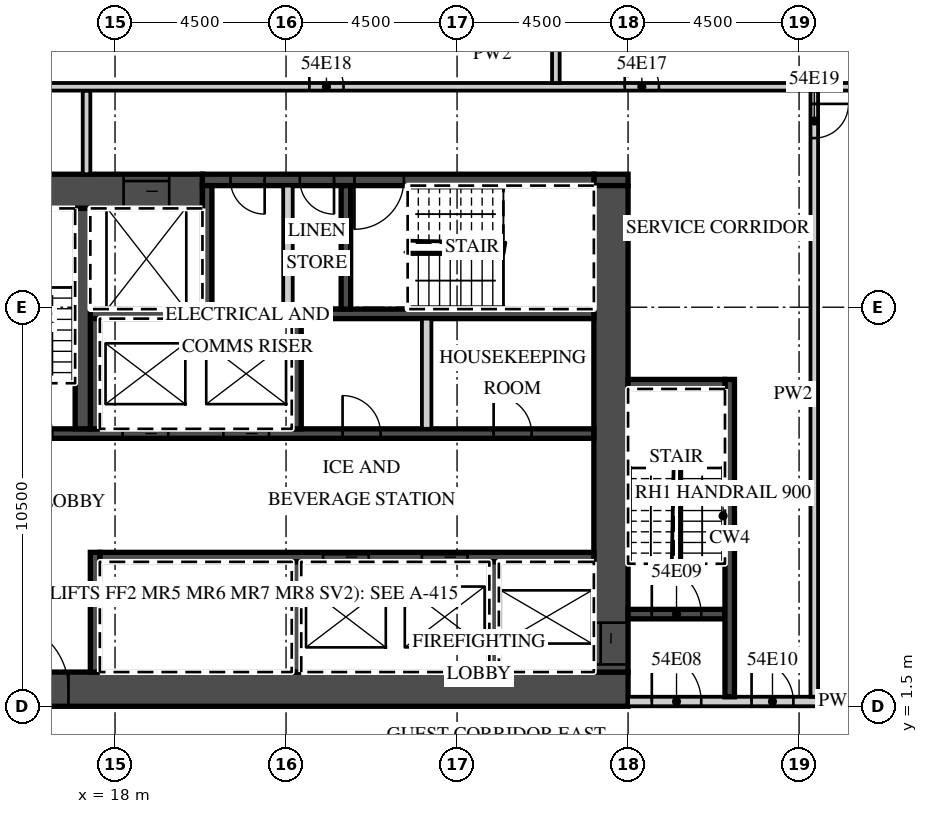
"""IFC4 building model, lengths in metres.
Left out: names, types, materials, properties, quantities, classifications, styles, units other than length and angle.
Written with IfcOpenShell. Run it as: python <this file> out.ifc"""

import sys

from ifc_helpers import new_model, si_unit, direction, frame, frame_2d, origin, place, context, subcontext, project, spatial, rectangle, extrude, element, fill, save


model = new_model("IFC4")
c1 = context("Model", 3, precision=1e-05, world=origin(), true_north=direction((0.0, 1.0)))
c2 = subcontext(c1, "Body", "Model", "MODEL_VIEW")
j1 = project(units=[si_unit("LENGTHUNIT", "METRE"), si_unit("PLANEANGLEUNIT", "RADIAN")], contexts=[c1])
p1 = place(None, origin())
s1 = spatial("IfcSite", under=j1, at=p1, CompositionType="ELEMENT")
p2 = place(p1, origin())
s2 = spatial("IfcBuilding", under=s1, at=p2, CompositionType="ELEMENT")
p3 = place(p2, frame((0.0, 0.0, 224.3)))
s3 = spatial("IfcBuildingStorey", under=s2, at=p3, CompositionType="ELEMENT", Elevation=224.3)
p4 = place(p3, frame((13.5, 1.95, 0.0), z_axis=(0.0, 0.0, 1.0), x_axis=(1.0, 0.0, 0.0)))
e1 = element("IfcWall", 1, at=p4, inside=s3, PredefinedType="SHEAR", context=c2, shape_type="SweptSolid", body=[
    extrude(rectangle(XDim=18.0, YDim=0.9, at=frame_2d((9.0, 0.0))), origin(), (0.0, 0.0, 1.0), 3.02),
])
p5 = place(p4, frame((1.475, 0.0, 0.0)))
e2 = element("IfcOpeningElement", 2, at=p5, cuts=e1, PredefinedType="OPENING", context=c2, shape_type="SweptSolid", body=[
    extrude(rectangle(XDim=1.8, YDim=2.1, at=frame_2d((0.9, 1.05))), frame((0.0, 0.46, 0.0), z_axis=(0.0, -1.0, 0.0), x_axis=(1.0, 0.0, 0.0)), (0.0, 0.0, 1.0), 0.92),
])
p6 = place(p3, frame((13.5, 15.05, 0.0), z_axis=(0.0, 0.0, 1.0), x_axis=(1.0, 0.0, 0.0)))
e3 = element("IfcWall", 3, at=p6, inside=s3, PredefinedType="SHEAR", context=c2, shape_type="SweptSolid", body=[
    extrude(rectangle(XDim=6.8, YDim=0.9, at=frame_2d((3.4, 0.0))), origin(), (0.0, 0.0, 1.0), 3.02),
])
p7 = place(p6, frame((4.725, 0.0, 0.0)))
e4 = element("IfcOpeningElement", 4, at=p7, cuts=e3, PredefinedType="OPENING", context=c2, shape_type="SweptSolid", body=[
    extrude(rectangle(XDim=1.2, YDim=2.1, at=frame_2d((0.6, 1.05))), frame((0.0, 0.46, 0.0), z_axis=(0.0, -1.0, 0.0), x_axis=(1.0, 0.0, 0.0)), (0.0, 0.0, 1.0), 0.92),
])
p8 = place(p3, frame((30.6, 15.35, 0.0), z_axis=(0.0, 0.0, 1.0), x_axis=(1.0, 0.0, 0.0)))
e5 = element("IfcWall", 5, at=p8, inside=s3, PredefinedType="SHEAR", context=c2, shape_type="SweptSolid", body=[
    extrude(rectangle(XDim=0.9, YDim=0.3, at=frame_2d((0.45, 0.0))), origin(), (0.0, 0.0, 1.0), 3.02),
])
p9 = place(p3, frame((20.3, 15.35, 0.0), z_axis=(0.0, 0.0, 1.0), x_axis=(1.0, 0.0, 0.0)))
e6 = element("IfcWall", 6, at=p9, inside=s3, PredefinedType="SHEAR", context=c2, shape_type="SweptSolid", body=[
    extrude(rectangle(XDim=10.3, YDim=0.3, at=frame_2d((5.15, 0.0))), origin(), (0.0, 0.0, 1.0), 3.02),
])
p10 = place(p9, frame((4.0, 0.0, 0.0)))
e7 = element("IfcOpeningElement", 7, at=p10, cuts=e6, PredefinedType="OPENING", context=c2, shape_type="SweptSolid", body=[
    extrude(rectangle(XDim=1.3, YDim=2.1, at=frame_2d((0.65, 1.05))), frame((0.0, 0.16, 0.0), z_axis=(0.0, -1.0, 0.0), x_axis=(1.0, 0.0, 0.0)), (0.0, 0.0, 1.0), 0.32),
])
p11 = place(p9, frame((2.562, 0.0, 0.0)))
e8 = element("IfcOpeningElement", 8, at=p11, cuts=e6, PredefinedType="OPENING", context=c2, shape_type="SweptSolid", body=[
    extrude(rectangle(XDim=0.9, YDim=2.1, at=frame_2d((0.45, 1.05))), frame((0.0, 0.16, 0.0), z_axis=(0.0, -1.0, 0.0), x_axis=(1.0, 0.0, 0.0)), (0.0, 0.0, 1.0), 0.32),
])
p12 = place(p9, frame((0.738, 0.0, 0.0)))
e9 = element("IfcOpeningElement", 9, at=p12, cuts=e6, PredefinedType="OPENING", context=c2, shape_type="SweptSolid", body=[
    extrude(rectangle(XDim=0.9, YDim=2.1, at=frame_2d((0.45, 1.05))), frame((0.0, 0.16, 0.0), z_axis=(0.0, -1.0, 0.0), x_axis=(1.0, 0.0, 0.0)), (0.0, 0.0, 1.0), 0.32),
])
p13 = place(p3, frame((31.05, 2.4, 0.0), z_axis=(0.0, 0.0, 1.0), x_axis=(0.0, 1.0, 0.0)))
e10 = element("IfcWall", 10, at=p13, inside=s3, PredefinedType="SHEAR", context=c2, shape_type="SweptSolid", body=[
    extrude(rectangle(XDim=12.8, YDim=0.9, at=frame_2d((6.4, 0.0))), origin(), (0.0, 0.0, 1.0), 3.02),
])
p14 = place(p13, frame((0.2, 0.0, 0.0)))
e11 = element("IfcOpeningElement", 11, at=p14, cuts=e10, PredefinedType="OPENING", context=c2, shape_type="SweptSolid", body=[
    extrude(rectangle(XDim=1.1, YDim=2.1, at=frame_2d((0.55, 1.05))), frame((0.0, 0.46, 0.0), z_axis=(0.0, -1.0, 0.0), x_axis=(1.0, 0.0, 0.0)), (0.0, 0.0, 1.0), 0.92),
])
p15 = place(p3, frame((17.6, 5.425, 0.0), z_axis=(0.0, 0.0, 1.0), x_axis=(1.0, 0.0, 0.0)))
e12 = element("IfcWall", 12, at=p15, inside=s3, PredefinedType="SHEAR", context=c2, shape_type="SweptSolid", body=[
    extrude(rectangle(XDim=13.0, YDim=0.25, at=frame_2d((6.5, 0.0))), origin(), (0.0, 0.0, 1.0), 3.02),
])
p16 = place(p15, frame((8.475, 0.0, 0.0)))
e13 = element("IfcOpeningElement", 13, at=p16, cuts=e12, PredefinedType="OPENING", context=c2, shape_type="SweptSolid", body=[
    extrude(rectangle(XDim=1.2, YDim=2.1, at=frame_2d((0.6, 1.05))), frame((0.0, 0.135, 0.0), z_axis=(0.0, -1.0, 0.0), x_axis=(1.0, 0.0, 0.0)), (0.0, 0.0, 1.0), 0.27),
])
p17 = place(p15, frame((5.875, 0.0, 0.0)))
e14 = element("IfcOpeningElement", 14, at=p17, cuts=e12, PredefinedType="OPENING", context=c2, shape_type="SweptSolid", body=[
    extrude(rectangle(XDim=1.2, YDim=2.1, at=frame_2d((0.6, 1.05))), frame((0.0, 0.135, 0.0), z_axis=(0.0, -1.0, 0.0), x_axis=(1.0, 0.0, 0.0)), (0.0, 0.0, 1.0), 0.27),
])
p18 = place(p3, frame((17.475, 2.4, 0.0), z_axis=(0.0, 0.0, 1.0), x_axis=(0.0, 1.0, 0.0)))
e15 = element("IfcWall", 15, at=p18, inside=s3, PredefinedType="SHEAR", context=c2, shape_type="SweptSolid", body=[
    extrude(rectangle(XDim=3.15, YDim=0.25, at=frame_2d((1.575, 0.0))), origin(), (0.0, 0.0, 1.0), 3.02),
])
for number, where, z_axis, x_axis in (
    (16, (27.975, 2.4, 0.0), (0.0, 0.0, 1.0), (0.0, 1.0, 0.0)),
    (17, (22.775, 2.4, 0.0), (0.0, 0.0, 1.0), (0.0, 1.0, 0.0)),
):
    element("IfcWall", number, at=place(p3, frame(where, z_axis=z_axis, x_axis=x_axis)), inside=s3, PredefinedType="SHEAR", context=c2, shape_type="SweptSolid", body=[
        extrude(rectangle(XDim=2.9, YDim=0.25, at=frame_2d((1.45, 0.0))), origin(), (0.0, 0.0, 1.0), 3.02),
    ])
p19 = place(p3, frame((14.4, 8.675, 0.0), z_axis=(0.0, 0.0, 1.0), x_axis=(1.0, 0.0, 0.0)))
e18 = element("IfcWall", 18, at=p19, inside=s3, PredefinedType="SHEAR", context=c2, shape_type="SweptSolid", body=[
    extrude(rectangle(XDim=16.2, YDim=0.25, at=frame_2d((8.1, 0.0))), origin(), (0.0, 0.0, 1.0), 3.02),
])
p20 = place(p19, frame((6.45, 0.0, 0.0)))
e19 = element("IfcOpeningElement", 19, at=p20, cuts=e18, PredefinedType="OPENING", context=c2, shape_type="SweptSolid", body=[
    extrude(rectangle(XDim=1.2, YDim=2.1, at=frame_2d((0.6, 1.05))), frame((0.0, 0.135, 0.0), z_axis=(0.0, -1.0, 0.0), x_axis=(1.0, 0.0, 0.0)), (0.0, 0.0, 1.0), 0.27),
])
p21 = place(p19, frame((3.8, 0.0, 0.0)))
e20 = element("IfcOpeningElement", 20, at=p21, cuts=e18, PredefinedType="OPENING", context=c2, shape_type="SweptSolid", body=[
    extrude(rectangle(XDim=1.2, YDim=2.1, at=frame_2d((0.6, 1.05))), frame((0.0, 0.135, 0.0), z_axis=(0.0, -1.0, 0.0), x_axis=(1.0, 0.0, 0.0)), (0.0, 0.0, 1.0), 0.27),
])
p22 = place(p19, frame((0.65, 0.0, 0.0)))
e21 = element("IfcOpeningElement", 21, at=p22, cuts=e18, PredefinedType="OPENING", context=c2, shape_type="SweptSolid", body=[
    extrude(rectangle(XDim=1.3, YDim=2.1, at=frame_2d((0.65, 1.05))), frame((0.0, 0.135, 0.0), z_axis=(0.0, -1.0, 0.0), x_axis=(1.0, 0.0, 0.0)), (0.0, 0.0, 1.0), 0.27),
])
p23 = place(p19, frame((13.562, 0.0, 0.0)))
e22 = element("IfcOpeningElement", 22, at=p23, cuts=e18, PredefinedType="OPENING", context=c2, shape_type="SweptSolid", body=[
    extrude(rectangle(XDim=1.0, YDim=2.1, at=frame_2d((0.5, 1.05))), frame((0.0, 0.135, 0.0), z_axis=(0.0, -1.0, 0.0), x_axis=(1.0, 0.0, 0.0)), (0.0, 0.0, 1.0), 0.27),
])
p24 = place(p19, frame((9.587, 0.0, 0.0)))
e23 = element("IfcOpeningElement", 23, at=p24, cuts=e18, PredefinedType="OPENING", context=c2, shape_type="SweptSolid", body=[
    extrude(rectangle(XDim=1.0, YDim=2.1, at=frame_2d((0.5, 1.05))), frame((0.0, 0.135, 0.0), z_axis=(0.0, -1.0, 0.0), x_axis=(1.0, 0.0, 0.0)), (0.0, 0.0, 1.0), 0.27),
])
p25 = place(p3, frame((17.35, 11.825, 0.0), z_axis=(0.0, 0.0, 1.0), x_axis=(1.0, 0.0, 0.0)))
e24 = element("IfcWall", 24, at=p25, inside=s3, PredefinedType="SHEAR", context=c2, shape_type="SweptSolid", body=[
    extrude(rectangle(XDim=13.25, YDim=0.25, at=frame_2d((6.625, 0.0))), origin(), (0.0, 0.0, 1.0), 3.02),
])
for number, where, z_axis, x_axis in (
    (25, (17.475, 8.8, 0.0), (0.0, 0.0, 1.0), (0.0, 1.0, 0.0)),
    (26, (22.775, 8.8, 0.0), (0.0, 0.0, 1.0), (0.0, 1.0, 0.0)),
):
    element("IfcWall", number, at=place(p3, frame(where, z_axis=z_axis, x_axis=x_axis)), inside=s3, PredefinedType="SHEAR", context=c2, shape_type="SweptSolid", body=[
        extrude(rectangle(XDim=2.9, YDim=0.25, at=frame_2d((1.45, 0.0))), origin(), (0.0, 0.0, 1.0), 3.02),
    ])
p26 = place(p3, frame((26.2, 8.8, 0.0), z_axis=(0.0, 0.0, 1.0), x_axis=(0.0, 1.0, 0.0)))
e27 = element("IfcWall", 27, at=p26, inside=s3, PredefinedType="PARTITIONING", context=c2, shape_type="SweptSolid", body=[
    extrude(rectangle(XDim=2.9, YDim=0.25, at=frame_2d((1.45, 0.0))), origin(), (0.0, 0.0, 1.0), 3.02),
])
p27 = place(p3, frame((17.15, 8.8, 0.0), z_axis=(0.0, 0.0, 1.0), x_axis=(0.0, 1.0, 0.0)))
e28 = element("IfcWall", 28, at=p27, inside=s3, PredefinedType="SHEAR", context=c2, shape_type="SweptSolid", body=[
    extrude(rectangle(XDim=5.8, YDim=0.4, at=frame_2d((2.9, 0.0))), origin(), (0.0, 0.0, 1.0), 3.02),
])
for number, where, z_axis, x_axis in (
    (29, (20.425, 11.95, 0.0), (0.0, 0.0, 1.0), (0.0, 1.0, 0.0)),
    (30, (24.075, 11.95, 0.0), (0.0, 0.0, 1.0), (0.0, 1.0, 0.0)),
):
    element("IfcWall", number, at=place(p3, frame(where, z_axis=z_axis, x_axis=x_axis)), inside=s3, PredefinedType="SHEAR", context=c2, shape_type="SweptSolid", body=[
        extrude(rectangle(XDim=3.25, YDim=0.25, at=frame_2d((1.625, 0.0))), origin(), (0.0, 0.0, 1.0), 3.02),
    ])
p28 = place(p3, frame((22.55, 11.95, 0.0), z_axis=(0.0, 0.0, 1.0), x_axis=(0.0, 1.0, 0.0)))
e31 = element("IfcWall", 31, at=p28, inside=s3, PredefinedType="PARTITIONING", context=c2, shape_type="SweptSolid", body=[
    extrude(rectangle(XDim=3.25, YDim=0.25, at=frame_2d((1.625, 0.0))), origin(), (0.0, 0.0, 1.0), 3.02),
])
p29 = place(p3, frame((31.5, 1.625, 0.0), z_axis=(0.0, 0.0, 1.0), x_axis=(1.0, 0.0, 0.0)))
e32 = element("IfcWall", 32, at=p29, inside=s3, PredefinedType="PARTITIONING", context=c2, shape_type="SweptSolid", body=[
    extrude(rectangle(XDim=11.04, YDim=0.25, at=frame_2d((5.52, 0.0))), origin(), (0.0, 0.0, 1.0), 3.02),
])
p30 = place(p29, frame((0.625, 0.0, 0.0)))
e33 = element("IfcOpeningElement", 33, at=p30, cuts=e32, PredefinedType="OPENING", context=c2, shape_type="SweptSolid", body=[
    extrude(rectangle(XDim=1.3, YDim=2.1, at=frame_2d((0.65, 1.05))), frame((0.0, 0.135, 0.0), z_axis=(0.0, -1.0, 0.0), x_axis=(1.0, 0.0, 0.0)), (0.0, 0.0, 1.0), 0.27),
])
p31 = place(p29, frame((3.25, 0.0, 0.0)))
e34 = element("IfcOpeningElement", 34, at=p31, cuts=e32, PredefinedType="OPENING", context=c2, shape_type="SweptSolid", body=[
    extrude(rectangle(XDim=1.1, YDim=2.1, at=frame_2d((0.55, 1.05))), frame((0.0, 0.135, 0.0), z_axis=(0.0, -1.0, 0.0), x_axis=(1.0, 0.0, 0.0)), (0.0, 0.0, 1.0), 0.27),
])
p32 = place(p3, frame((31.5, 3.925, 0.0), z_axis=(0.0, 0.0, 1.0), x_axis=(1.0, 0.0, 0.0)))
e35 = element("IfcWall", 35, at=p32, inside=s3, PredefinedType="SHEAR", context=c2, shape_type="SweptSolid", body=[
    extrude(rectangle(XDim=2.55, YDim=0.25, at=frame_2d((1.275, 0.0))), origin(), (0.0, 0.0, 1.0), 3.02),
])
p33 = place(p32, frame((0.625, 0.0, 0.0)))
e36 = element("IfcOpeningElement", 36, at=p33, cuts=e35, PredefinedType="OPENING", context=c2, shape_type="SweptSolid", body=[
    extrude(rectangle(XDim=1.3, YDim=2.1, at=frame_2d((0.65, 1.05))), frame((0.0, 0.135, 0.0), z_axis=(0.0, -1.0, 0.0), x_axis=(1.0, 0.0, 0.0)), (0.0, 0.0, 1.0), 0.27),
])
p34 = place(p3, frame((34.175, 1.75, 0.0), z_axis=(0.0, 0.0, 1.0), x_axis=(0.0, 1.0, 0.0)))
e37 = element("IfcWall", 37, at=p34, inside=s3, PredefinedType="SHEAR", context=c2, shape_type="SweptSolid", body=[
    extrude(rectangle(XDim=8.35, YDim=0.25, at=frame_2d((4.175, 0.0))), origin(), (0.0, 0.0, 1.0), 3.02),
])
p35 = place(p3, frame((31.5, 9.975, 0.0), z_axis=(0.0, 0.0, 1.0), x_axis=(1.0, 0.0, 0.0)))
e38 = element("IfcWall", 38, at=p35, inside=s3, PredefinedType="SHEAR", context=c2, shape_type="SweptSolid", body=[
    extrude(rectangle(XDim=2.55, YDim=0.25, at=frame_2d((1.275, 0.0))), origin(), (0.0, 0.0, 1.0), 3.02),
])
p36 = place(p3, frame((17.25, 15.5, 0.0), z_axis=(0.0, 0.0, 1.0), x_axis=(0.0, 1.0, 0.0)))
e39 = element("IfcWall", 39, at=p36, inside=s3, PredefinedType="PARTITIONING", context=c2, shape_type="SweptSolid", body=[
    extrude(rectangle(XDim=2.2, YDim=0.2, at=frame_2d((1.1, 0.0))), origin(), (0.0, 0.0, 1.0), 3.02),
])
p37 = place(p3, frame((36.4, 1.75, 0.0), z_axis=(0.0, 0.0, 1.0), x_axis=(0.0, 1.0, 0.0)))
e40 = element("IfcWall", 40, at=p37, inside=s3, PredefinedType="PARTITIONING", context=c2, shape_type="SweptSolid", body=[
    extrude(rectangle(XDim=15.95, YDim=0.2, at=frame_2d((7.975, 0.0))), origin(), (0.0, 0.0, 1.0), 3.02),
])
p38 = place(p37, frame((14.7, 0.0, 0.0)))
e41 = element("IfcOpeningElement", 41, at=p38, cuts=e40, PredefinedType="OPENING", context=c2, shape_type="SweptSolid", body=[
    extrude(rectangle(XDim=0.9, YDim=2.1, at=frame_2d((0.45, 1.05))), frame((0.0, 0.11, 0.0), z_axis=(0.0, -1.0, 0.0), x_axis=(1.0, 0.0, 0.0)), (0.0, 0.0, 1.0), 0.22),
])
p39 = place(p3, frame((13.6, 17.8, 0.0), z_axis=(0.0, 0.0, 1.0), x_axis=(1.0, 0.0, 0.0)))
e42 = element("IfcWall", 42, at=p39, inside=s3, PredefinedType="PARTITIONING", context=c2, shape_type="SweptSolid", body=[
    extrude(rectangle(XDim=28.657, YDim=0.2, at=frame_2d((14.329, 0.0))), origin(), (0.0, 0.0, 1.0), 3.02),
])
p40 = place(p39, frame((17.812, 0.0, 0.0)))
e43 = element("IfcOpeningElement", 43, at=p40, cuts=e42, PredefinedType="OPENING", context=c2, shape_type="SweptSolid", body=[
    extrude(rectangle(XDim=0.9, YDim=2.1, at=frame_2d((0.45, 1.05))), frame((0.0, 0.11, 0.0), z_axis=(0.0, -1.0, 0.0), x_axis=(1.0, 0.0, 0.0)), (0.0, 0.0, 1.0), 0.22),
])
p41 = place(p39, frame((9.512, 0.0, 0.0)))
e44 = element("IfcOpeningElement", 44, at=p41, cuts=e42, PredefinedType="OPENING", context=c2, shape_type="SweptSolid", body=[
    extrude(rectangle(XDim=0.9, YDim=2.1, at=frame_2d((0.45, 1.05))), frame((0.0, 0.11, 0.0), z_axis=(0.0, -1.0, 0.0), x_axis=(1.0, 0.0, 0.0)), (0.0, 0.0, 1.0), 0.22),
])
p42 = place(p3, frame((29.6, 17.9, 0.0), z_axis=(0.0, 0.0, 1.0), x_axis=(0.0, 1.0, 0.0)))
e45 = element("IfcWall", 45, at=p42, inside=s3, PredefinedType="PARTITIONING", context=c2, shape_type="SweptSolid", body=[
    extrude(rectangle(XDim=3.318, YDim=0.2, at=frame_2d((1.659, 0.0))), origin(), (0.0, 0.0, 1.0), 3.02),
])
p43 = place(p20, origin())
e46 = element("IfcDoor", 46, at=p43, inside=s3, OperationType="SLIDING_TO_LEFT", PredefinedType="DOOR", context=c2, shape_type="SweptSolid", body=[
    extrude(rectangle(XDim=1.2, YDim=2.1, at=frame_2d((0.6, 1.05))), frame((0.0, 0.025, 0.0), z_axis=(0.0, -1.0, 0.0), x_axis=(1.0, 0.0, 0.0)), (0.0, 0.0, 1.0), 0.05),
])
fill(e19, e46)
p44 = place(p21, origin())
e47 = element("IfcDoor", 47, at=p44, inside=s3, OperationType="SLIDING_TO_RIGHT", PredefinedType="DOOR", context=c2, shape_type="SweptSolid", body=[
    extrude(rectangle(XDim=1.2, YDim=2.1, at=frame_2d((0.6, 1.05))), frame((0.0, 0.025, 0.0), z_axis=(0.0, -1.0, 0.0), x_axis=(1.0, 0.0, 0.0)), (0.0, 0.0, 1.0), 0.05),
])
fill(e20, e47)
p45 = place(p16, origin())
e48 = element("IfcDoor", 48, at=p45, inside=s3, OperationType="SLIDING_TO_LEFT", PredefinedType="DOOR", context=c2, shape_type="SweptSolid", body=[
    extrude(rectangle(XDim=1.2, YDim=2.1, at=frame_2d((0.6, 1.05))), frame((0.0, 0.025, 0.0), z_axis=(0.0, -1.0, 0.0), x_axis=(1.0, 0.0, 0.0)), (0.0, 0.0, 1.0), 0.05),
])
fill(e13, e48)
p46 = place(p17, origin())
e49 = element("IfcDoor", 49, at=p46, inside=s3, OperationType="SLIDING_TO_RIGHT", PredefinedType="DOOR", context=c2, shape_type="SweptSolid", body=[
    extrude(rectangle(XDim=1.2, YDim=2.1, at=frame_2d((0.6, 1.05))), frame((0.0, 0.025, 0.0), z_axis=(0.0, -1.0, 0.0), x_axis=(1.0, 0.0, 0.0)), (0.0, 0.0, 1.0), 0.05),
])
fill(e14, e49)
p47 = place(p7, origin())
e50 = element("IfcDoor", 50, at=p47, inside=s3, OperationType="SLIDING_TO_LEFT", PredefinedType="DOOR", context=c2, shape_type="SweptSolid", body=[
    extrude(rectangle(XDim=1.2, YDim=2.1, at=frame_2d((0.6, 1.05))), frame((0.0, 0.025, 0.0), z_axis=(0.0, -1.0, 0.0), x_axis=(1.0, 0.0, 0.0)), (0.0, 0.0, 1.0), 0.05),
])
fill(e4, e50)
p48 = place(p14, origin())
e51 = element("IfcDoor", 51, at=p48, inside=s3, OperationType="SLIDING_TO_LEFT", PredefinedType="DOOR", context=c2, shape_type="SweptSolid", body=[
    extrude(rectangle(XDim=1.1, YDim=2.1, at=frame_2d((0.55, 1.05))), frame((0.0, 0.025, 0.0), z_axis=(0.0, -1.0, 0.0), x_axis=(1.0, 0.0, 0.0)), (0.0, 0.0, 1.0), 0.05),
])
fill(e11, e51)
p49 = place(p5, origin())
e52 = element("IfcDoor", 52, at=p49, inside=s3, OperationType="DOUBLE_DOOR_DOUBLE_SWING", PredefinedType="DOOR", context=c2, shape_type="SweptSolid", body=[
    extrude(rectangle(XDim=1.8, YDim=2.1, at=frame_2d((0.9, 1.05))), frame((0.0, 0.025, 0.0), z_axis=(0.0, -1.0, 0.0), x_axis=(1.0, 0.0, 0.0)), (0.0, 0.0, 1.0), 0.05),
])
fill(e2, e52)
p50 = place(p30, origin())
e53 = element("IfcDoor", 53, at=p50, inside=s3, OperationType="SINGLE_SWING_LEFT", PredefinedType="DOOR", context=c2, shape_type="SweptSolid", body=[
    extrude(rectangle(XDim=1.3, YDim=2.1, at=frame_2d((0.65, 1.05))), frame((0.0, 0.025, 0.0), z_axis=(0.0, -1.0, 0.0), x_axis=(1.0, 0.0, 0.0)), (0.0, 0.0, 1.0), 0.05),
])
fill(e33, e53)
p51 = place(p33, origin())
e54 = element("IfcDoor", 54, at=p51, inside=s3, OperationType="SINGLE_SWING_LEFT", PredefinedType="DOOR", context=c2, shape_type="SweptSolid", body=[
    extrude(rectangle(XDim=1.3, YDim=2.1, at=frame_2d((0.65, 1.05))), frame((0.0, 0.025, 0.0), z_axis=(0.0, -1.0, 0.0), x_axis=(1.0, 0.0, 0.0)), (0.0, 0.0, 1.0), 0.05),
])
fill(e36, e54)
p52 = place(p31, origin())
e55 = element("IfcDoor", 55, at=p52, inside=s3, OperationType="SINGLE_SWING_LEFT", PredefinedType="DOOR", context=c2, shape_type="SweptSolid", body=[
    extrude(rectangle(XDim=1.1, YDim=2.1, at=frame_2d((0.55, 1.05))), frame((0.0, 0.025, 0.0), z_axis=(0.0, -1.0, 0.0), x_axis=(1.0, 0.0, 0.0)), (0.0, 0.0, 1.0), 0.05),
])
fill(e34, e55)
p53 = place(p10, origin())
e56 = element("IfcDoor", 56, at=p53, inside=s3, OperationType="SINGLE_SWING_LEFT", PredefinedType="DOOR", context=c2, shape_type="SweptSolid", body=[
    extrude(rectangle(XDim=1.3, YDim=2.1, at=frame_2d((0.65, 1.05))), frame((0.0, 0.025, 0.0), z_axis=(0.0, -1.0, 0.0), x_axis=(1.0, 0.0, 0.0)), (0.0, 0.0, 1.0), 0.05),
])
fill(e7, e56)
p54 = place(p11, origin())
e57 = element("IfcDoor", 57, at=p54, inside=s3, OperationType="SINGLE_SWING_RIGHT", PredefinedType="DOOR", context=c2, shape_type="SweptSolid", body=[
    extrude(rectangle(XDim=0.9, YDim=2.1, at=frame_2d((0.45, 1.05))), frame((0.0, 0.025, 0.0), z_axis=(0.0, -1.0, 0.0), x_axis=(1.0, 0.0, 0.0)), (0.0, 0.0, 1.0), 0.05),
])
fill(e8, e57)
p55 = place(p12, origin())
e58 = element("IfcDoor", 58, at=p55, inside=s3, OperationType="SINGLE_SWING_RIGHT", PredefinedType="DOOR", context=c2, shape_type="SweptSolid", body=[
    extrude(rectangle(XDim=0.9, YDim=2.1, at=frame_2d((0.45, 1.05))), frame((0.0, 0.025, 0.0), z_axis=(0.0, -1.0, 0.0), x_axis=(1.0, 0.0, 0.0)), (0.0, 0.0, 1.0), 0.05),
])
fill(e9, e58)
p56 = place(p23, origin())
e59 = element("IfcDoor", 59, at=p56, inside=s3, OperationType="SINGLE_SWING_LEFT", PredefinedType="DOOR", context=c2, shape_type="SweptSolid", body=[
    extrude(rectangle(XDim=1.0, YDim=2.1, at=frame_2d((0.5, 1.05))), frame((0.0, 0.025, 0.0), z_axis=(0.0, -1.0, 0.0), x_axis=(1.0, 0.0, 0.0)), (0.0, 0.0, 1.0), 0.05),
])
fill(e22, e59)
p57 = place(p24, origin())
e60 = element("IfcDoor", 60, at=p57, inside=s3, OperationType="SINGLE_SWING_LEFT", PredefinedType="DOOR", context=c2, shape_type="SweptSolid", body=[
    extrude(rectangle(XDim=1.0, YDim=2.1, at=frame_2d((0.5, 1.05))), frame((0.0, 0.025, 0.0), z_axis=(0.0, -1.0, 0.0), x_axis=(1.0, 0.0, 0.0)), (0.0, 0.0, 1.0), 0.05),
])
fill(e23, e60)
p58 = place(p40, origin())
e61 = element("IfcDoor", 61, at=p58, inside=s3, OperationType="SINGLE_SWING_LEFT", PredefinedType="DOOR", context=c2, shape_type="SweptSolid", body=[
    extrude(rectangle(XDim=0.9, YDim=2.1, at=frame_2d((0.45, 1.05))), frame((0.0, 0.025, 0.0), z_axis=(0.0, -1.0, 0.0), x_axis=(1.0, 0.0, 0.0)), (0.0, 0.0, 1.0), 0.05),
])
fill(e43, e61)
p59 = place(p41, origin())
e62 = element("IfcDoor", 62, at=p59, inside=s3, OperationType="SINGLE_SWING_LEFT", PredefinedType="DOOR", context=c2, shape_type="SweptSolid", body=[
    extrude(rectangle(XDim=0.9, YDim=2.1, at=frame_2d((0.45, 1.05))), frame((0.0, 0.025, 0.0), z_axis=(0.0, -1.0, 0.0), x_axis=(1.0, 0.0, 0.0)), (0.0, 0.0, 1.0), 0.05),
])
fill(e44, e62)
p60 = place(p38, origin())
e63 = element("IfcDoor", 63, at=p60, inside=s3, OperationType="SINGLE_SWING_RIGHT", PredefinedType="DOOR", context=c2, shape_type="SweptSolid", body=[
    extrude(rectangle(XDim=0.9, YDim=2.1, at=frame_2d((0.45, 1.05))), frame((0.0, 0.025, 0.0), z_axis=(0.0, -1.0, 0.0), x_axis=(1.0, 0.0, 0.0)), (0.0, 0.0, 1.0), 0.05),
])
fill(e41, e63)
save(model, sys.argv[1])
